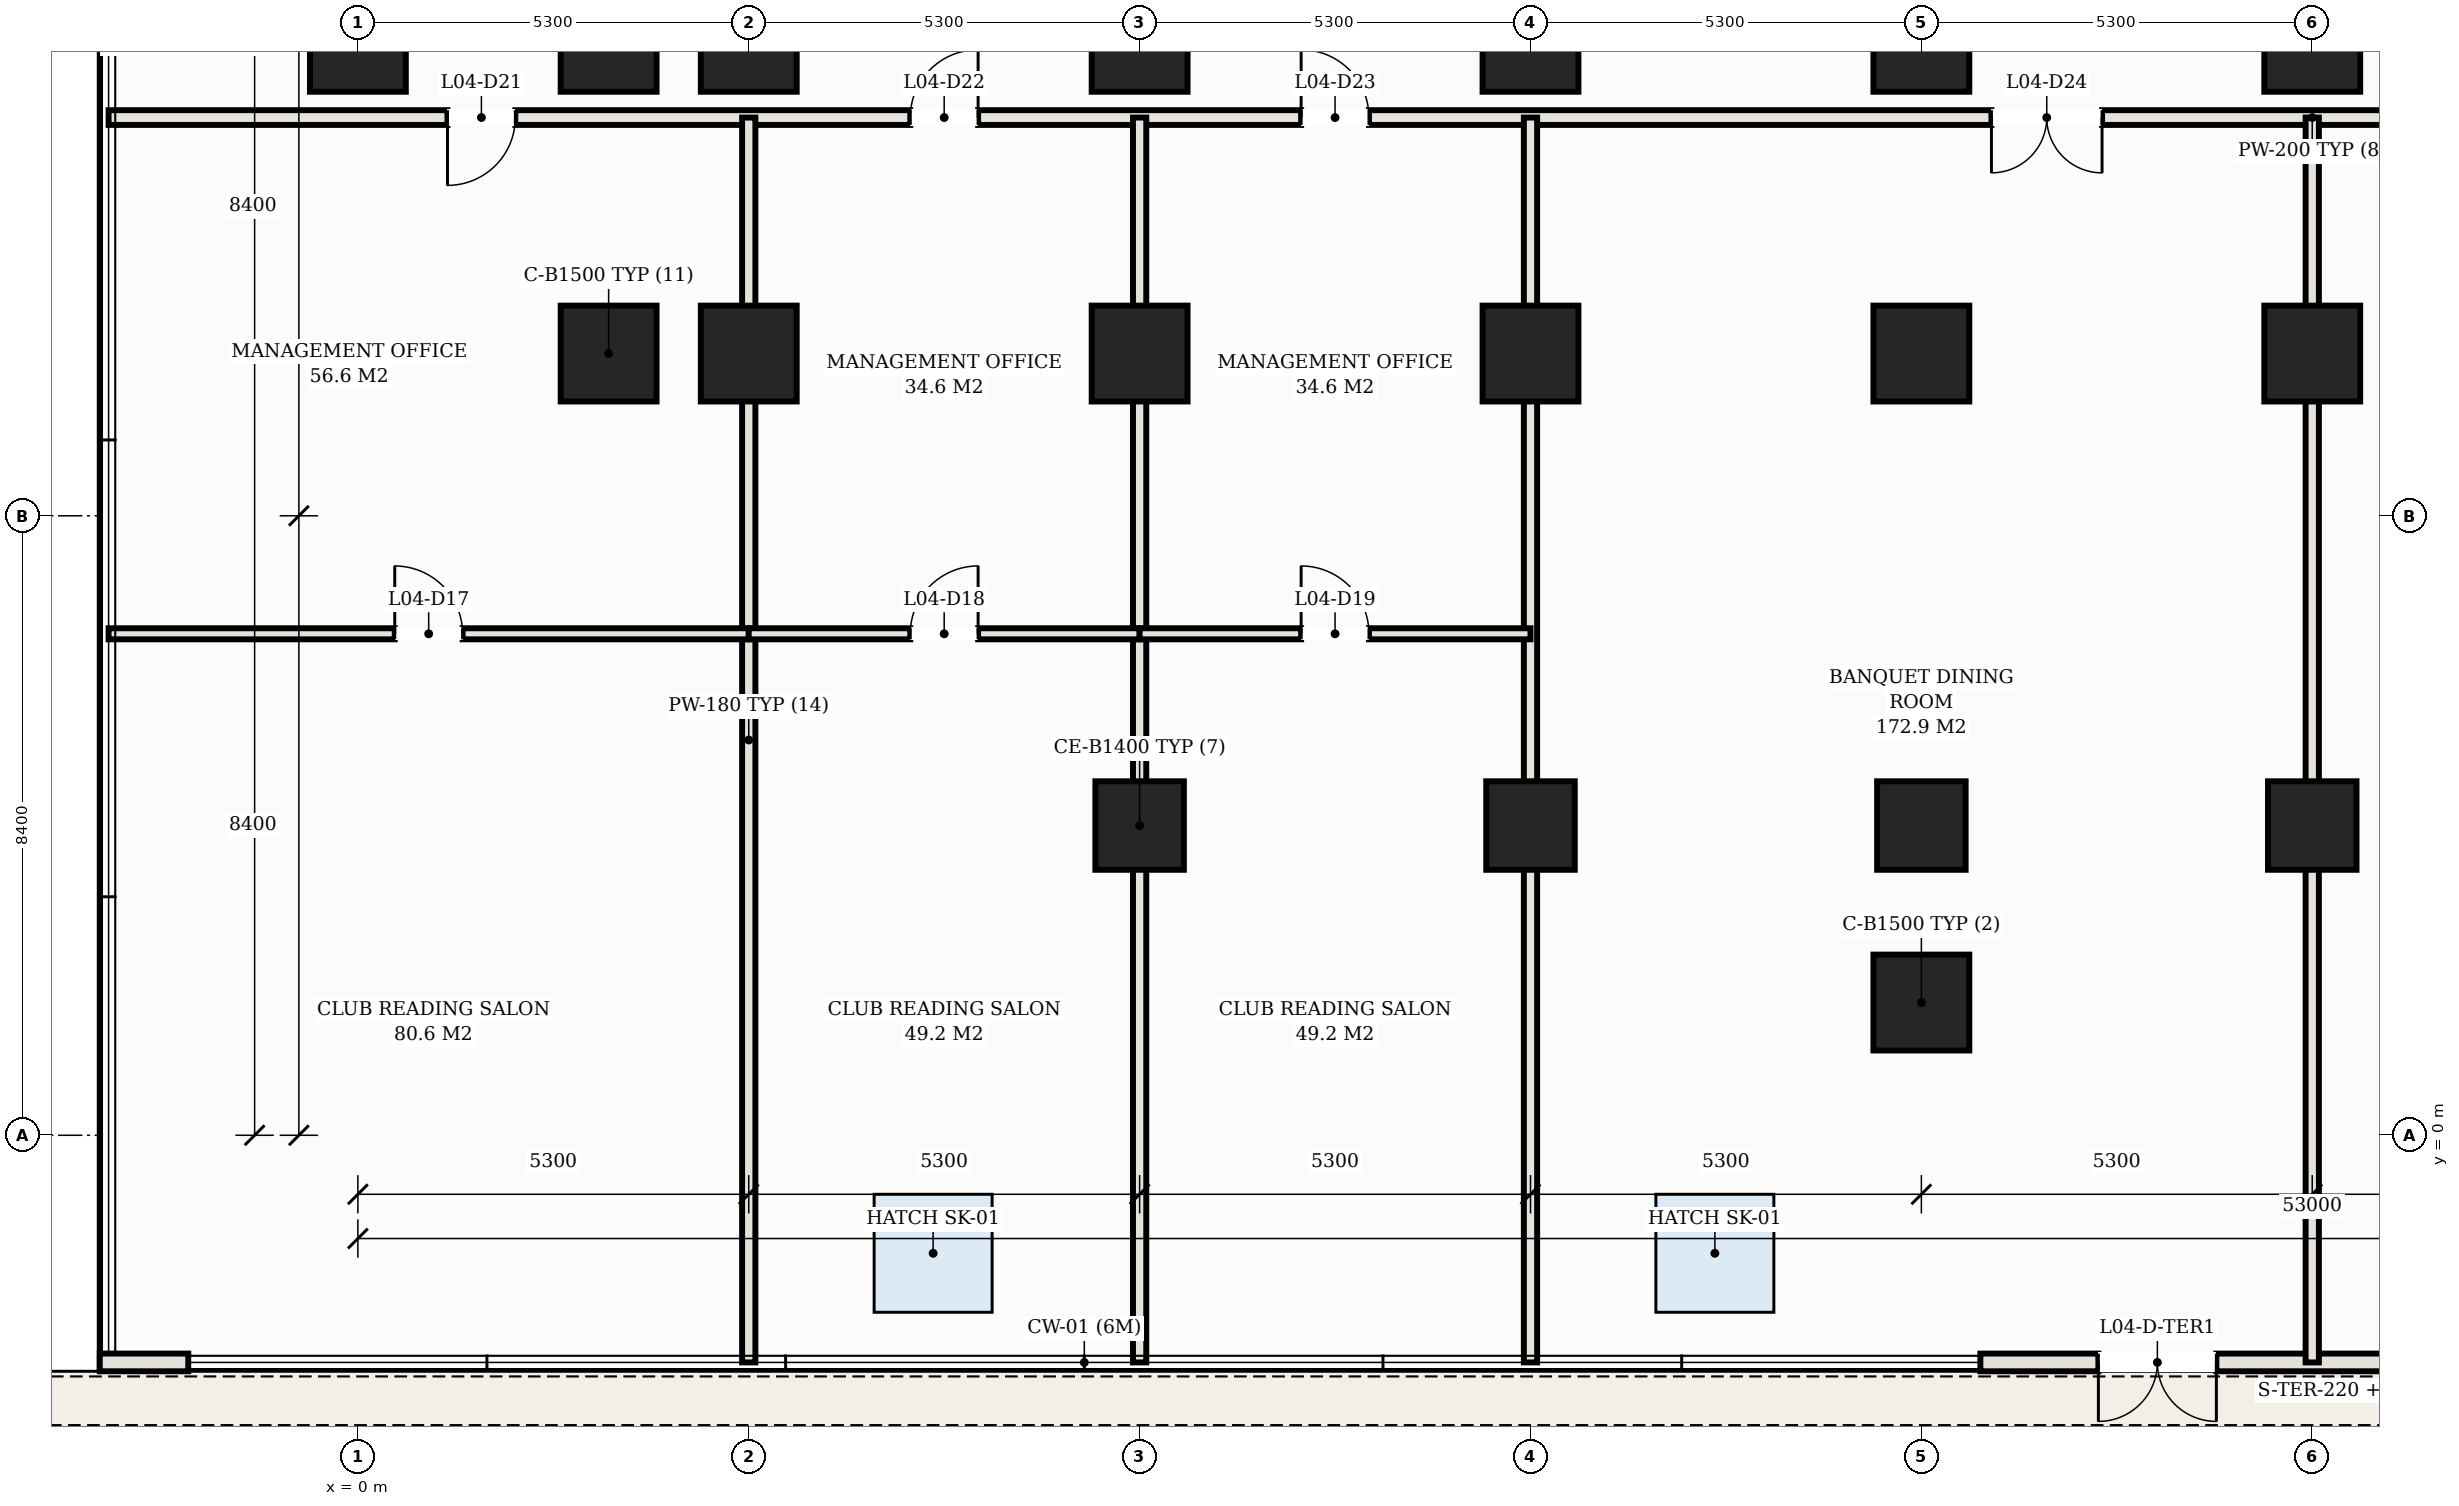
"""IFC4 building model, lengths in metres.
Left out: names, types, materials, properties, quantities, classifications, styles, units other than length and angle.
Written with IfcOpenShell. Run it as: python <this file> out.ifc"""

import sys

from ifc_helpers import new_model, si_unit, direction, frame, frame_2d, origin, origin_2d, place, context, subcontext, project, spatial, rectangle, hollow_rectangle, extrude, element, fill, save


model = new_model("IFC4")
c1 = context("Model", 3, precision=1e-05, world=origin(), true_north=direction((0.0, 1.0)))
c2 = subcontext(c1, "Body", "Model", "MODEL_VIEW")
j1 = project(units=[si_unit("LENGTHUNIT", "METRE"), si_unit("PLANEANGLEUNIT", "RADIAN")], contexts=[c1])
p1 = place(None, origin())
s1 = spatial("IfcSite", under=j1, at=p1, CompositionType="ELEMENT")
p2 = place(p1, origin())
s2 = spatial("IfcBuilding", under=s1, at=p2, CompositionType="ELEMENT")
p3 = place(p2, frame((0.0, 0.0, 19.0)))
s3 = spatial("IfcBuildingStorey", under=s2, at=p3, CompositionType="ELEMENT", Elevation=19.0)
for number, where, z_axis, x_axis in (
    (1, (21.2, 1.8, 0.0), (0.0, 0.0, 1.0), (1.0, 0.0, 0.0)),
    (2, (10.6, 14.8, 0.0), (0.0, 0.0, 1.0), (1.0, 0.0, 0.0)),
):
    element("IfcColumn", number, at=place(p3, frame(where, z_axis=z_axis, x_axis=x_axis)), inside=s3, PredefinedType="COLUMN", context=c2, shape_type="SweptSolid", body=[
        extrude(hollow_rectangle(XDim=1.3, YDim=1.3, WallThickness=0.042, at=origin_2d()), origin(), (0.0, 0.0, 1.0), 5.2),
    ])
p4 = place(p3, frame((10.6, 4.2, 0.0), z_axis=(0.0, 0.0, 1.0), x_axis=(1.0, 0.0, 0.0)))
e3 = element("IfcColumn", 3, at=p4, inside=s3, PredefinedType="COLUMN", context=c2, shape_type="SweptSolid", body=[
    extrude(hollow_rectangle(XDim=1.2, YDim=1.2, WallThickness=0.04, at=origin_2d()), origin(), (0.0, 0.0, 1.0), 5.2),
])
for number, where, z_axis, x_axis in (
    (4, (10.6, 10.6, 0.0), (0.0, 0.0, 1.0), (1.0, 0.0, 0.0)),
    (5, (15.9, 14.8, 0.0), (0.0, 0.0, 1.0), (1.0, 0.0, 0.0)),
):
    element("IfcColumn", number, at=place(p3, frame(where, z_axis=z_axis, x_axis=x_axis)), inside=s3, PredefinedType="COLUMN", context=c2, shape_type="SweptSolid", body=[
        extrude(hollow_rectangle(XDim=1.3, YDim=1.3, WallThickness=0.042, at=origin_2d()), origin(), (0.0, 0.0, 1.0), 5.2),
    ])
p5 = place(p3, frame((15.9, 4.2, 0.0), z_axis=(0.0, 0.0, 1.0), x_axis=(1.0, 0.0, 0.0)))
e6 = element("IfcColumn", 6, at=p5, inside=s3, PredefinedType="COLUMN", context=c2, shape_type="SweptSolid", body=[
    extrude(hollow_rectangle(XDim=1.2, YDim=1.2, WallThickness=0.04, at=origin_2d()), origin(), (0.0, 0.0, 1.0), 5.2),
])
for number, where, z_axis, x_axis in (
    (7, (15.9, 10.6, 0.0), (0.0, 0.0, 1.0), (1.0, 0.0, 0.0)),
    (8, (21.2, 14.8, 0.0), (0.0, 0.0, 1.0), (1.0, 0.0, 0.0)),
):
    element("IfcColumn", number, at=place(p3, frame(where, z_axis=z_axis, x_axis=x_axis)), inside=s3, PredefinedType="COLUMN", context=c2, shape_type="SweptSolid", body=[
        extrude(hollow_rectangle(XDim=1.3, YDim=1.3, WallThickness=0.042, at=origin_2d()), origin(), (0.0, 0.0, 1.0), 5.2),
    ])
p6 = place(p3, frame((21.2, 4.2, 0.0), z_axis=(0.0, 0.0, 1.0), x_axis=(1.0, 0.0, 0.0)))
e9 = element("IfcColumn", 9, at=p6, inside=s3, PredefinedType="COLUMN", context=c2, shape_type="SweptSolid", body=[
    extrude(hollow_rectangle(XDim=1.2, YDim=1.2, WallThickness=0.04, at=origin_2d()), origin(), (0.0, 0.0, 1.0), 5.2),
])
for number, where, z_axis, x_axis in (
    (10, (21.2, 10.6, 0.0), (0.0, 0.0, 1.0), (1.0, 0.0, 0.0)),
    (11, (26.5, 14.8, 0.0), (0.0, 0.0, 1.0), (1.0, 0.0, 0.0)),
):
    element("IfcColumn", number, at=place(p3, frame(where, z_axis=z_axis, x_axis=x_axis)), inside=s3, PredefinedType="COLUMN", context=c2, shape_type="SweptSolid", body=[
        extrude(hollow_rectangle(XDim=1.3, YDim=1.3, WallThickness=0.042, at=origin_2d()), origin(), (0.0, 0.0, 1.0), 5.2),
    ])
p7 = place(p3, frame((26.5, 4.2, 0.0), z_axis=(0.0, 0.0, 1.0), x_axis=(1.0, 0.0, 0.0)))
e12 = element("IfcColumn", 12, at=p7, inside=s3, PredefinedType="COLUMN", context=c2, shape_type="SweptSolid", body=[
    extrude(hollow_rectangle(XDim=1.2, YDim=1.2, WallThickness=0.04, at=origin_2d()), origin(), (0.0, 0.0, 1.0), 5.2),
])
for number, where, z_axis, x_axis in (
    (13, (26.5, 10.6, 0.0), (0.0, 0.0, 1.0), (1.0, 0.0, 0.0)),
    (14, (3.4, 10.6, 0.0), (0.0, 0.0, 1.0), (1.0, 0.0, 0.0)),
    (15, (3.4, 14.8, 0.0), (0.0, 0.0, 1.0), (1.0, 0.0, 0.0)),
    (16, (5.3, 10.6, 0.0), (0.0, 0.0, 1.0), (1.0, 0.0, 0.0)),
    (17, (5.3, 14.8, 0.0), (0.0, 0.0, 1.0), (1.0, 0.0, 0.0)),
    (18, (0.0, 14.8, 0.0), (0.0, 0.0, 1.0), (1.0, 0.0, 0.0)),
):
    element("IfcColumn", number, at=place(p3, frame(where, z_axis=z_axis, x_axis=x_axis)), inside=s3, PredefinedType="COLUMN", context=c2, shape_type="SweptSolid", body=[
        extrude(hollow_rectangle(XDim=1.3, YDim=1.3, WallThickness=0.042, at=origin_2d()), origin(), (0.0, 0.0, 1.0), 5.2),
    ])
p8 = place(p3, frame((-3.5, -3.08, 0.0), z_axis=(0.0, 0.0, 1.0), x_axis=(1.0, 0.0, 0.0)))
e19 = element("IfcWall", 19, at=p8, inside=s3, PredefinedType="SOLIDWALL", context=c2, shape_type="SweptSolid", body=[
    extrude(rectangle(XDim=1.2, YDim=0.24, at=frame_2d((0.6, 0.0))), origin(), (0.0, 0.0, 1.0), 4.86),
])
p9 = place(p3, frame((22.0, -3.08, 0.0), z_axis=(0.0, 0.0, 1.0), x_axis=(1.0, 0.0, 0.0)))
e20 = element("IfcWall", 20, at=p9, inside=s3, PredefinedType="SOLIDWALL", context=c2, shape_type="SweptSolid", body=[
    extrude(rectangle(XDim=9.0, YDim=0.24, at=frame_2d((4.5, 0.0))), origin(), (0.0, 0.0, 1.0), 4.86),
])
p10 = place(p9, frame((1.6, 0.0, 0.0)))
e21 = element("IfcOpeningElement", 21, at=p10, cuts=e20, PredefinedType="OPENING", context=c2, shape_type="SweptSolid", body=[
    extrude(rectangle(XDim=1.6, YDim=2.25, at=frame_2d((0.8, 1.125))), frame((0.0, 0.13, 0.0), z_axis=(0.0, -1.0, 0.0), x_axis=(1.0, 0.0, 0.0)), (0.0, 0.0, 1.0), 0.26),
])
p11 = place(p9, frame((5.6, 0.0, 0.75)))
e22 = element("IfcOpeningElement", 22, at=p11, cuts=e20, PredefinedType="OPENING", context=c2, shape_type="SweptSolid", body=[
    extrude(rectangle(XDim=2.4, YDim=2.0, at=frame_2d((1.2, 1.0))), frame((0.0, 0.13, 0.0), z_axis=(0.0, -1.0, 0.0), x_axis=(1.0, 0.0, 0.0)), (0.0, 0.0, 1.0), 0.26),
])
p12 = place(p3, frame((-3.38, 13.8, 0.0), z_axis=(0.0, 0.0, 1.0), x_axis=(1.0, 0.0, 0.0)))
e23 = element("IfcWall", 23, at=p12, inside=s3, PredefinedType="PARTITIONING", context=c2, shape_type="SweptSolid", body=[
    extrude(rectangle(XDim=59.76, YDim=0.2, at=frame_2d((29.88, 0.0))), origin(), (0.0, 0.0, 1.0), 4.86),
])
p13 = place(p12, frame((4.595, 0.0, 0.0)))
e24 = element("IfcOpeningElement", 24, at=p13, cuts=e23, PredefinedType="OPENING", context=c2, shape_type="SweptSolid", body=[
    extrude(rectangle(XDim=0.92, YDim=2.15, at=frame_2d((0.46, 1.075))), frame((0.0, 0.11, 0.0), z_axis=(0.0, -1.0, 0.0), x_axis=(1.0, 0.0, 0.0)), (0.0, 0.0, 1.0), 0.22),
])
p14 = place(p12, frame((10.87, 0.0, 0.0)))
e25 = element("IfcOpeningElement", 25, at=p14, cuts=e23, PredefinedType="OPENING", context=c2, shape_type="SweptSolid", body=[
    extrude(rectangle(XDim=0.92, YDim=2.15, at=frame_2d((0.46, 1.075))), frame((0.0, 0.11, 0.0), z_axis=(0.0, -1.0, 0.0), x_axis=(1.0, 0.0, 0.0)), (0.0, 0.0, 1.0), 0.22),
])
p15 = place(p12, frame((16.17, 0.0, 0.0)))
e26 = element("IfcOpeningElement", 26, at=p15, cuts=e23, PredefinedType="OPENING", context=c2, shape_type="SweptSolid", body=[
    extrude(rectangle(XDim=0.92, YDim=2.15, at=frame_2d((0.46, 1.075))), frame((0.0, 0.11, 0.0), z_axis=(0.0, -1.0, 0.0), x_axis=(1.0, 0.0, 0.0)), (0.0, 0.0, 1.0), 0.22),
])
p16 = place(p12, frame((25.53, 0.0, 0.0)))
e27 = element("IfcOpeningElement", 27, at=p16, cuts=e23, PredefinedType="OPENING", context=c2, shape_type="SweptSolid", body=[
    extrude(rectangle(XDim=1.5, YDim=2.25, at=frame_2d((0.75, 1.125))), frame((0.0, 0.11, 0.0), z_axis=(0.0, -1.0, 0.0), x_axis=(1.0, 0.0, 0.0)), (0.0, 0.0, 1.0), 0.22),
])
p17 = place(p12, frame((32.73, 0.0, 0.0)))
e28 = element("IfcOpeningElement", 28, at=p17, cuts=e23, PredefinedType="OPENING", context=c2, shape_type="SweptSolid", body=[
    extrude(rectangle(XDim=1.5, YDim=2.25, at=frame_2d((0.75, 1.125))), frame((0.0, 0.11, 0.0), z_axis=(0.0, -1.0, 0.0), x_axis=(1.0, 0.0, 0.0)), (0.0, 0.0, 1.0), 0.22),
])
p18 = place(p12, frame((46.73, 0.0, 0.0)))
e29 = element("IfcOpeningElement", 29, at=p18, cuts=e23, PredefinedType="OPENING", context=c2, shape_type="SweptSolid", body=[
    extrude(rectangle(XDim=1.5, YDim=2.25, at=frame_2d((0.75, 1.125))), frame((0.0, 0.11, 0.0), z_axis=(0.0, -1.0, 0.0), x_axis=(1.0, 0.0, 0.0)), (0.0, 0.0, 1.0), 0.22),
])
p19 = place(p12, frame((54.895, 0.0, 0.0)))
e30 = element("IfcOpeningElement", 30, at=p19, cuts=e23, PredefinedType="OPENING", context=c2, shape_type="SweptSolid", body=[
    extrude(rectangle(XDim=0.92, YDim=2.15, at=frame_2d((0.46, 1.075))), frame((0.0, 0.11, 0.0), z_axis=(0.0, -1.0, 0.0), x_axis=(1.0, 0.0, 0.0)), (0.0, 0.0, 1.0), 0.22),
])
p20 = place(p3, frame((5.3, -3.08, 0.0), z_axis=(0.0, 0.0, 1.0), x_axis=(0.0, 1.0, 0.0)))
e31 = element("IfcWall", 31, at=p20, inside=s3, PredefinedType="PARTITIONING", context=c2, shape_type="SweptSolid", body=[
    extrude(rectangle(XDim=16.88, YDim=0.18, at=frame_2d((8.44, 0.0))), origin(), (0.0, 0.0, 1.0), 4.055),
])
for number, where, z_axis, x_axis in (
    (32, (10.6, -3.08, 0.0), (0.0, 0.0, 1.0), (0.0, 1.0, 0.0)),
    (33, (15.9, -3.08, 0.0), (0.0, 0.0, 1.0), (0.0, 1.0, 0.0)),
    (34, (26.5, -3.08, 0.0), (0.0, 0.0, 1.0), (0.0, 1.0, 0.0)),
):
    element("IfcWall", number, at=place(p3, frame(where, z_axis=z_axis, x_axis=x_axis)), inside=s3, PredefinedType="PARTITIONING", context=c2, shape_type="SweptSolid", body=[
        extrude(rectangle(XDim=16.88, YDim=0.18, at=frame_2d((8.44, 0.0))), origin(), (0.0, 0.0, 1.0), 3.055),
    ])
p21 = place(p3, frame((-3.38, 6.8, 0.0), z_axis=(0.0, 0.0, 1.0), x_axis=(1.0, 0.0, 0.0)))
e35 = element("IfcWall", 35, at=p21, inside=s3, PredefinedType="PARTITIONING", context=c2, shape_type="SweptSolid", body=[
    extrude(rectangle(XDim=8.68, YDim=0.15, at=frame_2d((4.34, 0.0))), origin(), (0.0, 0.0, 1.0), 4.86),
])
p22 = place(p21, frame((3.88, 0.0, 0.0)))
e36 = element("IfcOpeningElement", 36, at=p22, cuts=e35, PredefinedType="OPENING", context=c2, shape_type="SweptSolid", body=[
    extrude(rectangle(XDim=0.92, YDim=2.15, at=frame_2d((0.46, 1.075))), frame((0.0, 0.085, 0.0), z_axis=(0.0, -1.0, 0.0), x_axis=(1.0, 0.0, 0.0)), (0.0, 0.0, 1.0), 0.17),
])
p23 = place(p3, frame((5.3, 6.8, 0.0), z_axis=(0.0, 0.0, 1.0), x_axis=(1.0, 0.0, 0.0)))
e37 = element("IfcWall", 37, at=p23, inside=s3, PredefinedType="PARTITIONING", context=c2, shape_type="SweptSolid", body=[
    extrude(rectangle(XDim=5.3, YDim=0.15, at=frame_2d((2.65, 0.0))), origin(), (0.0, 0.0, 1.0), 4.86),
])
p24 = place(p23, frame((2.19, 0.0, 0.0)))
e38 = element("IfcOpeningElement", 38, at=p24, cuts=e37, PredefinedType="OPENING", context=c2, shape_type="SweptSolid", body=[
    extrude(rectangle(XDim=0.92, YDim=2.15, at=frame_2d((0.46, 1.075))), frame((0.0, 0.085, 0.0), z_axis=(0.0, -1.0, 0.0), x_axis=(1.0, 0.0, 0.0)), (0.0, 0.0, 1.0), 0.17),
])
p25 = place(p3, frame((10.6, 6.8, 0.0), z_axis=(0.0, 0.0, 1.0), x_axis=(1.0, 0.0, 0.0)))
e39 = element("IfcWall", 39, at=p25, inside=s3, PredefinedType="PARTITIONING", context=c2, shape_type="SweptSolid", body=[
    extrude(rectangle(XDim=5.3, YDim=0.15, at=frame_2d((2.65, 0.0))), origin(), (0.0, 0.0, 1.0), 4.86),
])
p26 = place(p25, frame((2.19, 0.0, 0.0)))
e40 = element("IfcOpeningElement", 40, at=p26, cuts=e39, PredefinedType="OPENING", context=c2, shape_type="SweptSolid", body=[
    extrude(rectangle(XDim=0.92, YDim=2.15, at=frame_2d((0.46, 1.075))), frame((0.0, 0.085, 0.0), z_axis=(0.0, -1.0, 0.0), x_axis=(1.0, 0.0, 0.0)), (0.0, 0.0, 1.0), 0.17),
])
p27 = place(p10, frame((1.6, 0.0, 0.0), z_axis=(0.0, 0.0, 1.0), x_axis=(-1.0, 0.0, 0.0)))
e41 = element("IfcDoor", 41, at=p27, inside=s3, OperationType="DOUBLE_DOOR_SINGLE_SWING", PredefinedType="DOOR", context=c2, shape_type="SweptSolid", body=[
    extrude(rectangle(XDim=1.6, YDim=2.25, at=frame_2d((0.8, 1.125))), frame((0.0, 0.025, 0.0), z_axis=(0.0, -1.0, 0.0), x_axis=(1.0, 0.0, 0.0)), (0.0, 0.0, 1.0), 0.05),
])
fill(e21, e41)
p28 = place(p3, frame((0.0, 0.0, -0.26)))
p29 = place(p28, frame((7.8, -1.6, 0.21)))
e42 = element("IfcWindow", 42, at=p29, inside=s3, PartitioningType="SINGLE_PANEL", PredefinedType="SKYLIGHT", context=c2, shape_type="SweptSolid", body=[
    extrude(rectangle(XDim=1.6, YDim=1.6, at=origin_2d()), origin(), (0.0, 0.0, 1.0), 0.05),
])
p30 = place(p28, frame((18.4, -1.6, 0.21)))
e43 = element("IfcWindow", 43, at=p30, inside=s3, PartitioningType="SINGLE_PANEL", PredefinedType="SKYLIGHT", context=c2, shape_type="SweptSolid", body=[
    extrude(rectangle(XDim=1.6, YDim=1.6, at=origin_2d()), origin(), (0.0, 0.0, 1.0), 0.05),
])
p31 = place(p22, origin())
e44 = element("IfcDoor", 44, at=p31, inside=s3, OperationType="SINGLE_SWING_LEFT", PredefinedType="DOOR", context=c2, shape_type="SweptSolid", body=[
    extrude(rectangle(XDim=0.92, YDim=2.15, at=frame_2d((0.46, 1.075))), frame((0.0, 0.025, 0.0), z_axis=(0.0, -1.0, 0.0), x_axis=(1.0, 0.0, 0.0)), (0.0, 0.0, 1.0), 0.05),
])
fill(e36, e44)
p32 = place(p24, origin())
e45 = element("IfcDoor", 45, at=p32, inside=s3, OperationType="SINGLE_SWING_RIGHT", PredefinedType="DOOR", context=c2, shape_type="SweptSolid", body=[
    extrude(rectangle(XDim=0.92, YDim=2.15, at=frame_2d((0.46, 1.075))), frame((0.0, 0.025, 0.0), z_axis=(0.0, -1.0, 0.0), x_axis=(1.0, 0.0, 0.0)), (0.0, 0.0, 1.0), 0.05),
])
fill(e38, e45)
p33 = place(p26, origin())
e46 = element("IfcDoor", 46, at=p33, inside=s3, OperationType="SINGLE_SWING_LEFT", PredefinedType="DOOR", context=c2, shape_type="SweptSolid", body=[
    extrude(rectangle(XDim=0.92, YDim=2.15, at=frame_2d((0.46, 1.075))), frame((0.0, 0.025, 0.0), z_axis=(0.0, -1.0, 0.0), x_axis=(1.0, 0.0, 0.0)), (0.0, 0.0, 1.0), 0.05),
])
fill(e40, e46)
p34 = place(p13, frame((0.92, 0.0, 0.0), z_axis=(0.0, 0.0, 1.0), x_axis=(-1.0, 0.0, 0.0)))
e47 = element("IfcDoor", 47, at=p34, inside=s3, OperationType="SINGLE_SWING_RIGHT", PredefinedType="DOOR", context=c2, shape_type="SweptSolid", body=[
    extrude(rectangle(XDim=0.92, YDim=2.15, at=frame_2d((0.46, 1.075))), frame((0.0, 0.025, 0.0), z_axis=(0.0, -1.0, 0.0), x_axis=(1.0, 0.0, 0.0)), (0.0, 0.0, 1.0), 0.05),
])
fill(e24, e47)
p35 = place(p14, origin())
e48 = element("IfcDoor", 48, at=p35, inside=s3, OperationType="SINGLE_SWING_RIGHT", PredefinedType="DOOR", context=c2, shape_type="SweptSolid", body=[
    extrude(rectangle(XDim=0.92, YDim=2.15, at=frame_2d((0.46, 1.075))), frame((0.0, 0.025, 0.0), z_axis=(0.0, -1.0, 0.0), x_axis=(1.0, 0.0, 0.0)), (0.0, 0.0, 1.0), 0.05),
])
fill(e25, e48)
p36 = place(p15, origin())
e49 = element("IfcDoor", 49, at=p36, inside=s3, OperationType="SINGLE_SWING_LEFT", PredefinedType="DOOR", context=c2, shape_type="SweptSolid", body=[
    extrude(rectangle(XDim=0.92, YDim=2.15, at=frame_2d((0.46, 1.075))), frame((0.0, 0.025, 0.0), z_axis=(0.0, -1.0, 0.0), x_axis=(1.0, 0.0, 0.0)), (0.0, 0.0, 1.0), 0.05),
])
fill(e26, e49)
p37 = place(p16, frame((1.5, 0.0, 0.0), z_axis=(0.0, 0.0, 1.0), x_axis=(-1.0, 0.0, 0.0)))
e50 = element("IfcDoor", 50, at=p37, inside=s3, OperationType="DOUBLE_DOOR_SINGLE_SWING", PredefinedType="DOOR", context=c2, shape_type="SweptSolid", body=[
    extrude(rectangle(XDim=1.5, YDim=2.25, at=frame_2d((0.75, 1.125))), frame((0.0, 0.025, 0.0), z_axis=(0.0, -1.0, 0.0), x_axis=(1.0, 0.0, 0.0)), (0.0, 0.0, 1.0), 0.05),
])
fill(e27, e50)
save(model, sys.argv[1])
